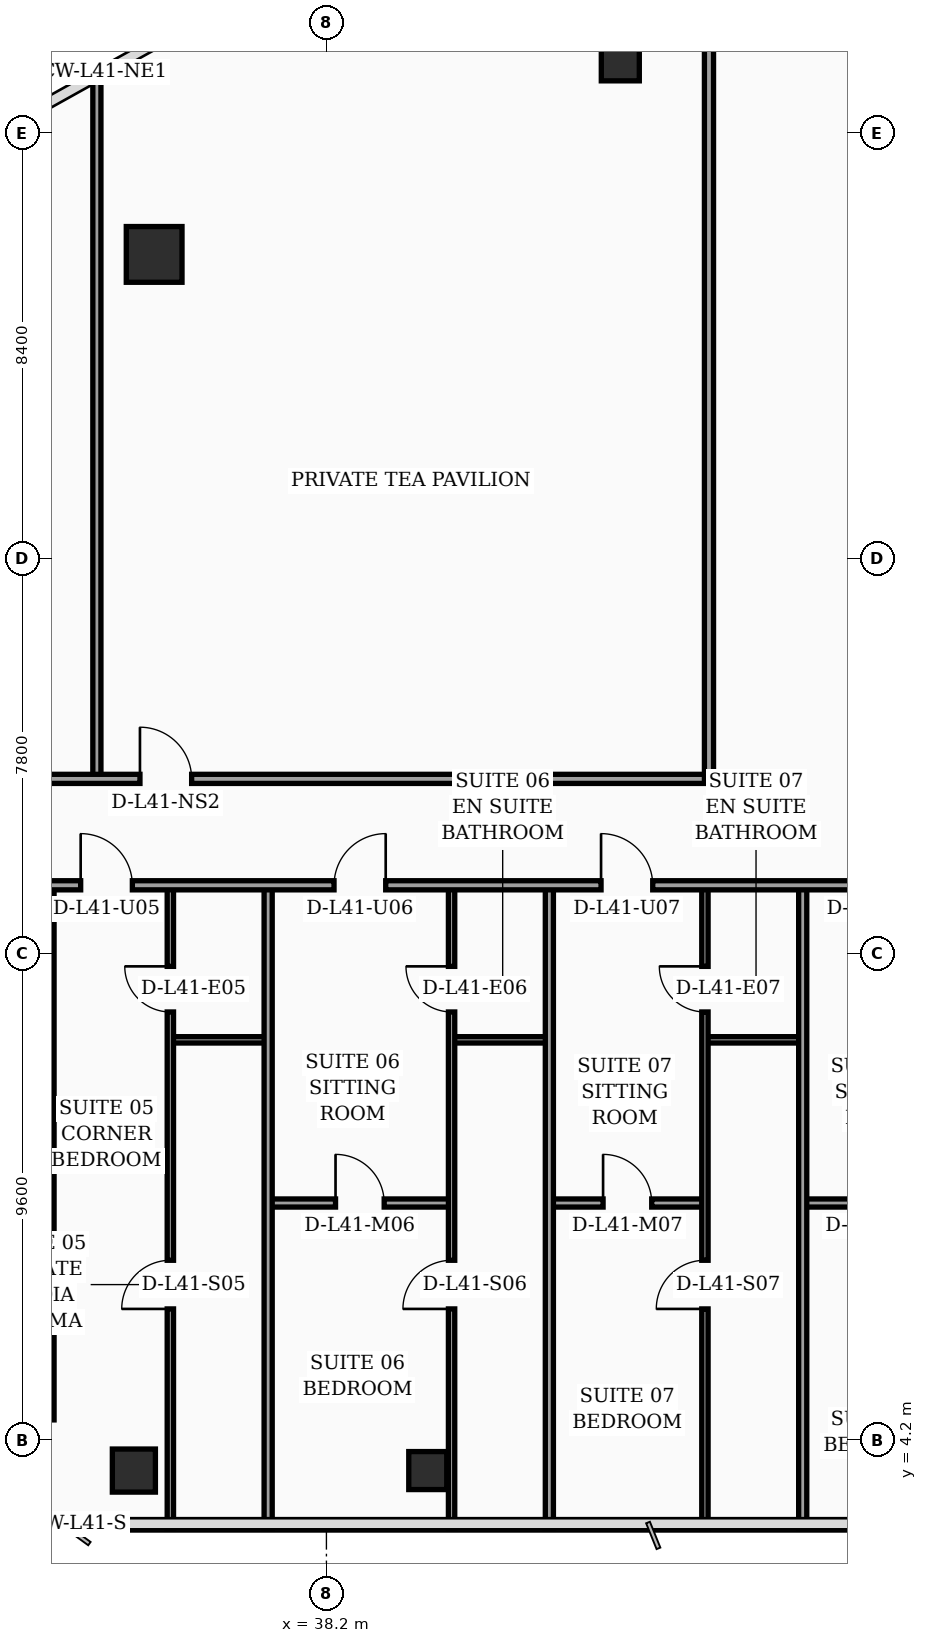
"""IFC4 building model, lengths in metres.
Left out: names, types, materials, properties, quantities, classifications, styles, units other than length and angle.
Written with IfcOpenShell. Run it as: python <this file> out.ifc"""

import sys

from ifc_helpers import new_model, si_unit, direction, frame, frame_2d, origin, origin_2d, place, context, subcontext, project, spatial, rectangle, hollow_rectangle, circle, extrude, element, fill, save


model = new_model("IFC4")
c1 = context("Model", 3, precision=1e-05, world=origin(), true_north=direction((0.0, 1.0)))
c2 = subcontext(c1, "Body", "Model", "MODEL_VIEW")
j1 = project(units=[si_unit("LENGTHUNIT", "METRE"), si_unit("PLANEANGLEUNIT", "RADIAN")], contexts=[c1])
p1 = place(None, origin())
s1 = spatial("IfcSite", under=j1, at=p1, CompositionType="ELEMENT")
p2 = place(p1, origin())
s2 = spatial("IfcBuilding", under=s1, at=p2, CompositionType="ELEMENT")
p3 = place(p2, frame((0.0, 0.0, 167.5)))
s3 = spatial("IfcBuildingStorey", under=s2, at=p3, CompositionType="ELEMENT", Elevation=167.5)
p4 = place(p3, frame((32.4, 4.6, 0.0), z_axis=(0.0, 0.0, 1.0), x_axis=(0.0, 1.0, 0.0)))
e1 = element("IfcWall", 1, at=p4, inside=s3, PredefinedType="SHEAR", context=c2, shape_type="SweptSolid", body=[
    extrude(rectangle(XDim=10.4, YDim=0.85, at=frame_2d((5.2, 0.0))), origin(), (0.0, 0.0, 1.0), 3.56),
])
p5 = place(p3, frame((34.4, 3.6, 0.0), z_axis=(0.0, 0.0, 1.0), x_axis=(1.0, 0.0, 0.0)))
e2 = element("IfcColumn", 2, at=p5, inside=s3, PredefinedType="COLUMN", context=c2, shape_type="SweptSolid", body=[
    extrude(hollow_rectangle(XDim=0.85, YDim=0.85, WallThickness=0.036, at=origin_2d()), origin(), (0.0, 0.0, 1.0), 3.56),
])
p6 = place(p3, frame((40.2, 3.6, 0.0), z_axis=(0.0, 0.0, 1.0), x_axis=(1.0, 0.0, 0.0)))
e3 = element("IfcColumn", 3, at=p6, inside=s3, PredefinedType="COLUMN", context=c2, shape_type="SweptSolid", body=[
    extrude(hollow_rectangle(XDim=0.75, YDim=0.75, WallThickness=0.032, at=origin_2d()), origin(), (0.0, 0.0, 1.0), 3.56),
])
p7 = place(p3, frame((34.8, 27.6, 0.0), z_axis=(0.0, 0.0, 1.0), x_axis=(1.0, 0.0, 0.0)))
e4 = element("IfcColumn", 4, at=p7, inside=s3, PredefinedType="COLUMN", context=c2, shape_type="SweptSolid", body=[
    extrude(circle(Radius=0.55, at=origin_2d()), origin(), (0.0, 0.0, 1.0), 3.56),
])
p8 = place(p3, frame((44.0, 31.4, 0.0), z_axis=(0.0, 0.0, 1.0), x_axis=(1.0, 0.0, 0.0)))
e5 = element("IfcColumn", 5, at=p8, inside=s3, PredefinedType="COLUMN", context=c2, shape_type="SweptSolid", body=[
    extrude(hollow_rectangle(XDim=0.75, YDim=0.75, WallThickness=0.032, at=origin_2d()), origin(), (0.0, 0.0, 1.0), 3.56),
])
p9 = place(p3, frame((35.12, 12.1, 0.0), z_axis=(0.0, 0.0, 1.0), x_axis=(1.0, 0.0, 0.0)))
e6 = element("IfcWall", 6, at=p9, inside=s3, PredefinedType="PARTITIONING", context=c2, shape_type="SweptSolid", body=[
    extrude(rectangle(XDim=1.93, YDim=0.125, at=frame_2d((0.965, 0.0))), origin(), (0.0, 0.0, 1.0), 3.56),
])
p10 = place(p3, frame((35.12, 2.44, 0.0), z_axis=(0.0, 0.0, 1.0), x_axis=(0.0, 1.0, 0.0)))
e7 = element("IfcWall", 7, at=p10, inside=s3, PredefinedType="PARTITIONING", context=c2, shape_type="SweptSolid", body=[
    extrude(rectangle(XDim=12.71, YDim=0.125, at=frame_2d((6.355, 0.0))), origin(), (0.0, 0.0, 1.0), 2.94),
])
p11 = place(p10, frame((4.35, 0.0, 0.0)))
e8 = element("IfcOpeningElement", 8, at=p11, cuts=e7, PredefinedType="OPENING", context=c2, shape_type="SweptSolid", body=[
    extrude(rectangle(XDim=0.96, YDim=2.2, at=frame_2d((0.48, 1.1))), frame((0.0, 0.073, 0.0), z_axis=(0.0, -1.0, 0.0), x_axis=(1.0, 0.0, 0.0)), (0.0, 0.0, 1.0), 0.145),
])
p12 = place(p10, frame((10.21, 0.0, 0.0)))
e9 = element("IfcOpeningElement", 9, at=p12, cuts=e7, PredefinedType="OPENING", context=c2, shape_type="SweptSolid", body=[
    extrude(rectangle(XDim=0.9, YDim=2.15, at=frame_2d((0.45, 1.075))), frame((0.0, 0.073, 0.0), z_axis=(0.0, -1.0, 0.0), x_axis=(1.0, 0.0, 0.0)), (0.0, 0.0, 1.0), 0.145),
])
p13 = place(p3, frame((40.67, 12.1, 0.0), z_axis=(0.0, 0.0, 1.0), x_axis=(1.0, 0.0, 0.0)))
e10 = element("IfcWall", 10, at=p13, inside=s3, PredefinedType="PARTITIONING", context=c2, shape_type="SweptSolid", body=[
    extrude(rectangle(XDim=1.93, YDim=0.125, at=frame_2d((0.965, 0.0))), origin(), (0.0, 0.0, 1.0), 3.56),
])
p14 = place(p3, frame((37.05, 8.88, 0.0), z_axis=(0.0, 0.0, 1.0), x_axis=(1.0, 0.0, 0.0)))
e11 = element("IfcWall", 11, at=p14, inside=s3, PredefinedType="PARTITIONING", context=c2, shape_type="SweptSolid", body=[
    extrude(rectangle(XDim=3.62, YDim=0.16, at=frame_2d((1.81, 0.0))), origin(), (0.0, 0.0, 1.0), 2.94),
])
p15 = place(p14, frame((1.33, 0.0, 0.0)))
e12 = element("IfcOpeningElement", 12, at=p15, cuts=e11, PredefinedType="OPENING", context=c2, shape_type="SweptSolid", body=[
    extrude(rectangle(XDim=0.96, YDim=2.2, at=frame_2d((0.48, 1.1))), frame((0.0, 0.09, 0.0), z_axis=(0.0, -1.0, 0.0), x_axis=(1.0, 0.0, 0.0)), (0.0, 0.0, 1.0), 0.18),
])
p16 = place(p3, frame((40.67, 2.44, 0.0), z_axis=(0.0, 0.0, 1.0), x_axis=(0.0, 1.0, 0.0)))
e13 = element("IfcWall", 13, at=p16, inside=s3, PredefinedType="PARTITIONING", context=c2, shape_type="SweptSolid", body=[
    extrude(rectangle(XDim=12.71, YDim=0.125, at=frame_2d((6.355, 0.0))), origin(), (0.0, 0.0, 1.0), 2.94),
])
p17 = place(p16, frame((4.35, 0.0, 0.0)))
e14 = element("IfcOpeningElement", 14, at=p17, cuts=e13, PredefinedType="OPENING", context=c2, shape_type="SweptSolid", body=[
    extrude(rectangle(XDim=0.96, YDim=2.2, at=frame_2d((0.48, 1.1))), frame((0.0, 0.073, 0.0), z_axis=(0.0, -1.0, 0.0), x_axis=(1.0, 0.0, 0.0)), (0.0, 0.0, 1.0), 0.145),
])
p18 = place(p16, frame((10.21, 0.0, 0.0)))
e15 = element("IfcOpeningElement", 15, at=p18, cuts=e13, PredefinedType="OPENING", context=c2, shape_type="SweptSolid", body=[
    extrude(rectangle(XDim=0.9, YDim=2.15, at=frame_2d((0.45, 1.075))), frame((0.0, 0.073, 0.0), z_axis=(0.0, -1.0, 0.0), x_axis=(1.0, 0.0, 0.0)), (0.0, 0.0, 1.0), 0.145),
])
p19 = place(p3, frame((37.05, 2.44, 0.0), z_axis=(0.0, 0.0, 1.0), x_axis=(0.0, 1.0, 0.0)))
e16 = element("IfcWall", 16, at=p19, inside=s3, PredefinedType="PARTITIONING", context=c2, shape_type="SweptSolid", body=[
    extrude(rectangle(XDim=12.71, YDim=0.16, at=frame_2d((6.355, 0.0))), origin(), (0.0, 0.0, 1.0), 2.94),
])
p20 = place(p3, frame((45.67, 12.1, 0.0), z_axis=(0.0, 0.0, 1.0), x_axis=(1.0, 0.0, 0.0)))
e17 = element("IfcWall", 17, at=p20, inside=s3, PredefinedType="PARTITIONING", context=c2, shape_type="SweptSolid", body=[
    extrude(rectangle(XDim=1.93, YDim=0.125, at=frame_2d((0.965, 0.0))), origin(), (0.0, 0.0, 1.0), 2.94),
])
p21 = place(p3, frame((42.6, 8.88, 0.0), z_axis=(0.0, 0.0, 1.0), x_axis=(1.0, 0.0, 0.0)))
e18 = element("IfcWall", 18, at=p21, inside=s3, PredefinedType="PARTITIONING", context=c2, shape_type="SweptSolid", body=[
    extrude(rectangle(XDim=3.07, YDim=0.16, at=frame_2d((1.535, 0.0))), origin(), (0.0, 0.0, 1.0), 3.09),
])
p22 = place(p21, frame((1.06, 0.0, 0.0)))
e19 = element("IfcOpeningElement", 19, at=p22, cuts=e18, PredefinedType="OPENING", context=c2, shape_type="SweptSolid", body=[
    extrude(rectangle(XDim=0.96, YDim=2.2, at=frame_2d((0.48, 1.1))), frame((0.0, 0.09, 0.0), z_axis=(0.0, -1.0, 0.0), x_axis=(1.0, 0.0, 0.0)), (0.0, 0.0, 1.0), 0.18),
])
p23 = place(p3, frame((45.67, 2.44, 0.0), z_axis=(0.0, 0.0, 1.0), x_axis=(0.0, 1.0, 0.0)))
e20 = element("IfcWall", 20, at=p23, inside=s3, PredefinedType="PARTITIONING", context=c2, shape_type="SweptSolid", body=[
    extrude(rectangle(XDim=12.71, YDim=0.125, at=frame_2d((6.355, 0.0))), origin(), (0.0, 0.0, 1.0), 3.04),
])
p24 = place(p23, frame((4.35, 0.0, 0.0)))
e21 = element("IfcOpeningElement", 21, at=p24, cuts=e20, PredefinedType="OPENING", context=c2, shape_type="SweptSolid", body=[
    extrude(rectangle(XDim=0.96, YDim=2.2, at=frame_2d((0.48, 1.1))), frame((0.0, 0.073, 0.0), z_axis=(0.0, -1.0, 0.0), x_axis=(1.0, 0.0, 0.0)), (0.0, 0.0, 1.0), 0.145),
])
p25 = place(p23, frame((10.21, 0.0, 0.0)))
e22 = element("IfcOpeningElement", 22, at=p25, cuts=e20, PredefinedType="OPENING", context=c2, shape_type="SweptSolid", body=[
    extrude(rectangle(XDim=0.9, YDim=2.15, at=frame_2d((0.45, 1.075))), frame((0.0, 0.073, 0.0), z_axis=(0.0, -1.0, 0.0), x_axis=(1.0, 0.0, 0.0)), (0.0, 0.0, 1.0), 0.145),
])
p26 = place(p3, frame((42.6, 2.44, 0.0), z_axis=(0.0, 0.0, 1.0), x_axis=(0.0, 1.0, 0.0)))
e23 = element("IfcWall", 23, at=p26, inside=s3, PredefinedType="PARTITIONING", context=c2, shape_type="SweptSolid", body=[
    extrude(rectangle(XDim=12.71, YDim=0.16, at=frame_2d((6.355, 0.0))), origin(), (0.0, 0.0, 1.0), 3.04),
])
p27 = place(p3, frame((47.6, 8.88, 0.0), z_axis=(0.0, 0.0, 1.0), x_axis=(1.0, 0.0, 0.0)))
e24 = element("IfcWall", 24, at=p27, inside=s3, PredefinedType="PARTITIONING", context=c2, shape_type="SweptSolid", body=[
    extrude(rectangle(XDim=3.07, YDim=0.16, at=frame_2d((1.535, 0.0))), origin(), (0.0, 0.0, 1.0), 2.94),
])
p28 = place(p27, frame((1.06, 0.0, 0.0)))
e25 = element("IfcOpeningElement", 25, at=p28, cuts=e24, PredefinedType="OPENING", context=c2, shape_type="SweptSolid", body=[
    extrude(rectangle(XDim=0.96, YDim=2.2, at=frame_2d((0.48, 1.1))), frame((0.0, 0.09, 0.0), z_axis=(0.0, -1.0, 0.0), x_axis=(1.0, 0.0, 0.0)), (0.0, 0.0, 1.0), 0.18),
])
p29 = place(p3, frame((47.6, 2.44, 0.0), z_axis=(0.0, 0.0, 1.0), x_axis=(0.0, 1.0, 0.0)))
e26 = element("IfcWall", 26, at=p29, inside=s3, PredefinedType="PARTITIONING", context=c2, shape_type="SweptSolid", body=[
    extrude(rectangle(XDim=12.71, YDim=0.16, at=frame_2d((6.355, 0.0))), origin(), (0.0, 0.0, 1.0), 2.94),
])
p30 = place(p3, frame((32.4, 15.15, 0.0), z_axis=(0.0, 0.0, 1.0), x_axis=(1.0, 0.0, 0.0)))
e27 = element("IfcWall", 27, at=p30, inside=s3, PredefinedType="PARTITIONING", context=c2, shape_type="SweptSolid", body=[
    extrude(rectangle(XDim=20.2, YDim=0.18, at=frame_2d((10.1, 0.0))), origin(), (0.0, 0.0, 1.0), 2.94),
])
p31 = place(p30, frame((0.95, 0.0, 0.0)))
e28 = element("IfcOpeningElement", 28, at=p31, cuts=e27, PredefinedType="OPENING", context=c2, shape_type="SweptSolid", body=[
    extrude(rectangle(XDim=1.02, YDim=2.2, at=frame_2d((0.51, 1.1))), frame((0.0, 0.1, 0.0), z_axis=(0.0, -1.0, 0.0), x_axis=(1.0, 0.0, 0.0)), (0.0, 0.0, 1.0), 0.2),
])
p32 = place(p30, frame((5.95, 0.0, 0.0)))
e29 = element("IfcOpeningElement", 29, at=p32, cuts=e27, PredefinedType="OPENING", context=c2, shape_type="SweptSolid", body=[
    extrude(rectangle(XDim=1.02, YDim=2.2, at=frame_2d((0.51, 1.1))), frame((0.0, 0.1, 0.0), z_axis=(0.0, -1.0, 0.0), x_axis=(1.0, 0.0, 0.0)), (0.0, 0.0, 1.0), 0.2),
])
p33 = place(p30, frame((11.22, 0.0, 0.0)))
e30 = element("IfcOpeningElement", 30, at=p33, cuts=e27, PredefinedType="OPENING", context=c2, shape_type="SweptSolid", body=[
    extrude(rectangle(XDim=1.02, YDim=2.2, at=frame_2d((0.51, 1.1))), frame((0.0, 0.1, 0.0), z_axis=(0.0, -1.0, 0.0), x_axis=(1.0, 0.0, 0.0)), (0.0, 0.0, 1.0), 0.2),
])
p34 = place(p30, frame((16.22, 0.0, 0.0)))
e31 = element("IfcOpeningElement", 31, at=p34, cuts=e27, PredefinedType="OPENING", context=c2, shape_type="SweptSolid", body=[
    extrude(rectangle(XDim=1.02, YDim=2.2, at=frame_2d((0.51, 1.1))), frame((0.0, 0.1, 0.0), z_axis=(0.0, -1.0, 0.0), x_axis=(1.0, 0.0, 0.0)), (0.0, 0.0, 1.0), 0.2),
])
p35 = place(p3, frame((33.67, 17.25, 0.0), z_axis=(0.0, 0.0, 1.0), x_axis=(0.0, 1.0, 0.0)))
e32 = element("IfcWall", 32, at=p35, inside=s3, PredefinedType="PARTITIONING", context=c2, shape_type="SweptSolid", body=[
    extrude(rectangle(XDim=13.96, YDim=0.16, at=frame_2d((6.98, 0.0))), origin(), (0.0, 0.0, 1.0), 2.94),
])
p36 = place(p3, frame((21.5, 17.25, 0.0), z_axis=(0.0, 0.0, 1.0), x_axis=(1.0, 0.0, 0.0)))
e33 = element("IfcWall", 33, at=p36, inside=s3, PredefinedType="PARTITIONING", context=c2, shape_type="SweptSolid", body=[
    extrude(rectangle(XDim=24.25, YDim=0.18, at=frame_2d((12.125, 0.0))), origin(), (0.0, 0.0, 1.0), 2.94),
])
p37 = place(p36, frame((0.95, 0.0, 0.0)))
e34 = element("IfcOpeningElement", 34, at=p37, cuts=e33, PredefinedType="OPENING", context=c2, shape_type="SweptSolid", body=[
    extrude(rectangle(XDim=1.02, YDim=2.2, at=frame_2d((0.51, 1.1))), frame((0.0, 0.1, 0.0), z_axis=(0.0, -1.0, 0.0), x_axis=(1.0, 0.0, 0.0)), (0.0, 0.0, 1.0), 0.2),
])
p38 = place(p36, frame((13.02, 0.0, 0.0)))
e35 = element("IfcOpeningElement", 35, at=p38, cuts=e33, PredefinedType="OPENING", context=c2, shape_type="SweptSolid", body=[
    extrude(rectangle(XDim=1.02, YDim=2.2, at=frame_2d((0.51, 1.1))), frame((0.0, 0.1, 0.0), z_axis=(0.0, -1.0, 0.0), x_axis=(1.0, 0.0, 0.0)), (0.0, 0.0, 1.0), 0.2),
])
p39 = place(p3, frame((45.75, 17.25, 0.0), z_axis=(0.0, 0.0, 1.0), x_axis=(0.0, 1.0, 0.0)))
e36 = element("IfcWall", 36, at=p39, inside=s3, PredefinedType="PARTITIONING", context=c2, shape_type="SweptSolid", body=[
    extrude(rectangle(XDim=20.69, YDim=0.18, at=frame_2d((10.345, 0.0))), origin(), (0.0, 0.0, 1.0), 2.94),
])
p40 = place(p11, origin())
e37 = element("IfcDoor", 37, at=p40, inside=s3, OperationType="SINGLE_SWING_LEFT", PredefinedType="DOOR", context=c2, shape_type="SweptSolid", body=[
    extrude(rectangle(XDim=0.96, YDim=2.2, at=frame_2d((0.48, 1.1))), frame((0.0, 0.025, 0.0), z_axis=(0.0, -1.0, 0.0), x_axis=(1.0, 0.0, 0.0)), (0.0, 0.0, 1.0), 0.05),
])
fill(e8, e37)
p41 = place(p12, origin())
e38 = element("IfcDoor", 38, at=p41, inside=s3, OperationType="SINGLE_SWING_RIGHT", PredefinedType="DOOR", context=c2, shape_type="SweptSolid", body=[
    extrude(rectangle(XDim=0.9, YDim=2.15, at=frame_2d((0.45, 1.075))), frame((0.0, 0.025, 0.0), z_axis=(0.0, -1.0, 0.0), x_axis=(1.0, 0.0, 0.0)), (0.0, 0.0, 1.0), 0.05),
])
fill(e9, e38)
p42 = place(p15, origin())
e39 = element("IfcDoor", 39, at=p42, inside=s3, OperationType="SINGLE_SWING_LEFT", PredefinedType="DOOR", context=c2, shape_type="SweptSolid", body=[
    extrude(rectangle(XDim=0.96, YDim=2.2, at=frame_2d((0.48, 1.1))), frame((0.0, 0.025, 0.0), z_axis=(0.0, -1.0, 0.0), x_axis=(1.0, 0.0, 0.0)), (0.0, 0.0, 1.0), 0.05),
])
fill(e12, e39)
p43 = place(p17, origin())
e40 = element("IfcDoor", 40, at=p43, inside=s3, OperationType="SINGLE_SWING_LEFT", PredefinedType="DOOR", context=c2, shape_type="SweptSolid", body=[
    extrude(rectangle(XDim=0.96, YDim=2.2, at=frame_2d((0.48, 1.1))), frame((0.0, 0.025, 0.0), z_axis=(0.0, -1.0, 0.0), x_axis=(1.0, 0.0, 0.0)), (0.0, 0.0, 1.0), 0.05),
])
fill(e14, e40)
p44 = place(p18, origin())
e41 = element("IfcDoor", 41, at=p44, inside=s3, OperationType="SINGLE_SWING_RIGHT", PredefinedType="DOOR", context=c2, shape_type="SweptSolid", body=[
    extrude(rectangle(XDim=0.9, YDim=2.15, at=frame_2d((0.45, 1.075))), frame((0.0, 0.025, 0.0), z_axis=(0.0, -1.0, 0.0), x_axis=(1.0, 0.0, 0.0)), (0.0, 0.0, 1.0), 0.05),
])
fill(e15, e41)
p45 = place(p22, origin())
e42 = element("IfcDoor", 42, at=p45, inside=s3, OperationType="SINGLE_SWING_LEFT", PredefinedType="DOOR", context=c2, shape_type="SweptSolid", body=[
    extrude(rectangle(XDim=0.96, YDim=2.2, at=frame_2d((0.48, 1.1))), frame((0.0, 0.025, 0.0), z_axis=(0.0, -1.0, 0.0), x_axis=(1.0, 0.0, 0.0)), (0.0, 0.0, 1.0), 0.05),
])
fill(e19, e42)
p46 = place(p24, origin())
e43 = element("IfcDoor", 43, at=p46, inside=s3, OperationType="SINGLE_SWING_LEFT", PredefinedType="DOOR", context=c2, shape_type="SweptSolid", body=[
    extrude(rectangle(XDim=0.96, YDim=2.2, at=frame_2d((0.48, 1.1))), frame((0.0, 0.025, 0.0), z_axis=(0.0, -1.0, 0.0), x_axis=(1.0, 0.0, 0.0)), (0.0, 0.0, 1.0), 0.05),
])
fill(e21, e43)
p47 = place(p25, origin())
e44 = element("IfcDoor", 44, at=p47, inside=s3, OperationType="SINGLE_SWING_RIGHT", PredefinedType="DOOR", context=c2, shape_type="SweptSolid", body=[
    extrude(rectangle(XDim=0.9, YDim=2.15, at=frame_2d((0.45, 1.075))), frame((0.0, 0.025, 0.0), z_axis=(0.0, -1.0, 0.0), x_axis=(1.0, 0.0, 0.0)), (0.0, 0.0, 1.0), 0.05),
])
fill(e22, e44)
p48 = place(p31, origin())
e45 = element("IfcDoor", 45, at=p48, inside=s3, OperationType="SINGLE_SWING_LEFT", PredefinedType="DOOR", context=c2, shape_type="SweptSolid", body=[
    extrude(rectangle(XDim=1.02, YDim=2.2, at=frame_2d((0.51, 1.1))), frame((0.0, 0.025, 0.0), z_axis=(0.0, -1.0, 0.0), x_axis=(1.0, 0.0, 0.0)), (0.0, 0.0, 1.0), 0.05),
])
fill(e28, e45)
p49 = place(p32, origin())
e46 = element("IfcDoor", 46, at=p49, inside=s3, OperationType="SINGLE_SWING_RIGHT", PredefinedType="DOOR", context=c2, shape_type="SweptSolid", body=[
    extrude(rectangle(XDim=1.02, YDim=2.2, at=frame_2d((0.51, 1.1))), frame((0.0, 0.025, 0.0), z_axis=(0.0, -1.0, 0.0), x_axis=(1.0, 0.0, 0.0)), (0.0, 0.0, 1.0), 0.05),
])
fill(e29, e46)
p50 = place(p33, origin())
e47 = element("IfcDoor", 47, at=p50, inside=s3, OperationType="SINGLE_SWING_LEFT", PredefinedType="DOOR", context=c2, shape_type="SweptSolid", body=[
    extrude(rectangle(XDim=1.02, YDim=2.2, at=frame_2d((0.51, 1.1))), frame((0.0, 0.025, 0.0), z_axis=(0.0, -1.0, 0.0), x_axis=(1.0, 0.0, 0.0)), (0.0, 0.0, 1.0), 0.05),
])
fill(e30, e47)
p51 = place(p38, origin())
e48 = element("IfcDoor", 48, at=p51, inside=s3, OperationType="SINGLE_SWING_LEFT", PredefinedType="DOOR", context=c2, shape_type="SweptSolid", body=[
    extrude(rectangle(XDim=1.02, YDim=2.2, at=frame_2d((0.51, 1.1))), frame((0.0, 0.025, 0.0), z_axis=(0.0, -1.0, 0.0), x_axis=(1.0, 0.0, 0.0)), (0.0, 0.0, 1.0), 0.05),
])
fill(e35, e48)
save(model, sys.argv[1])
